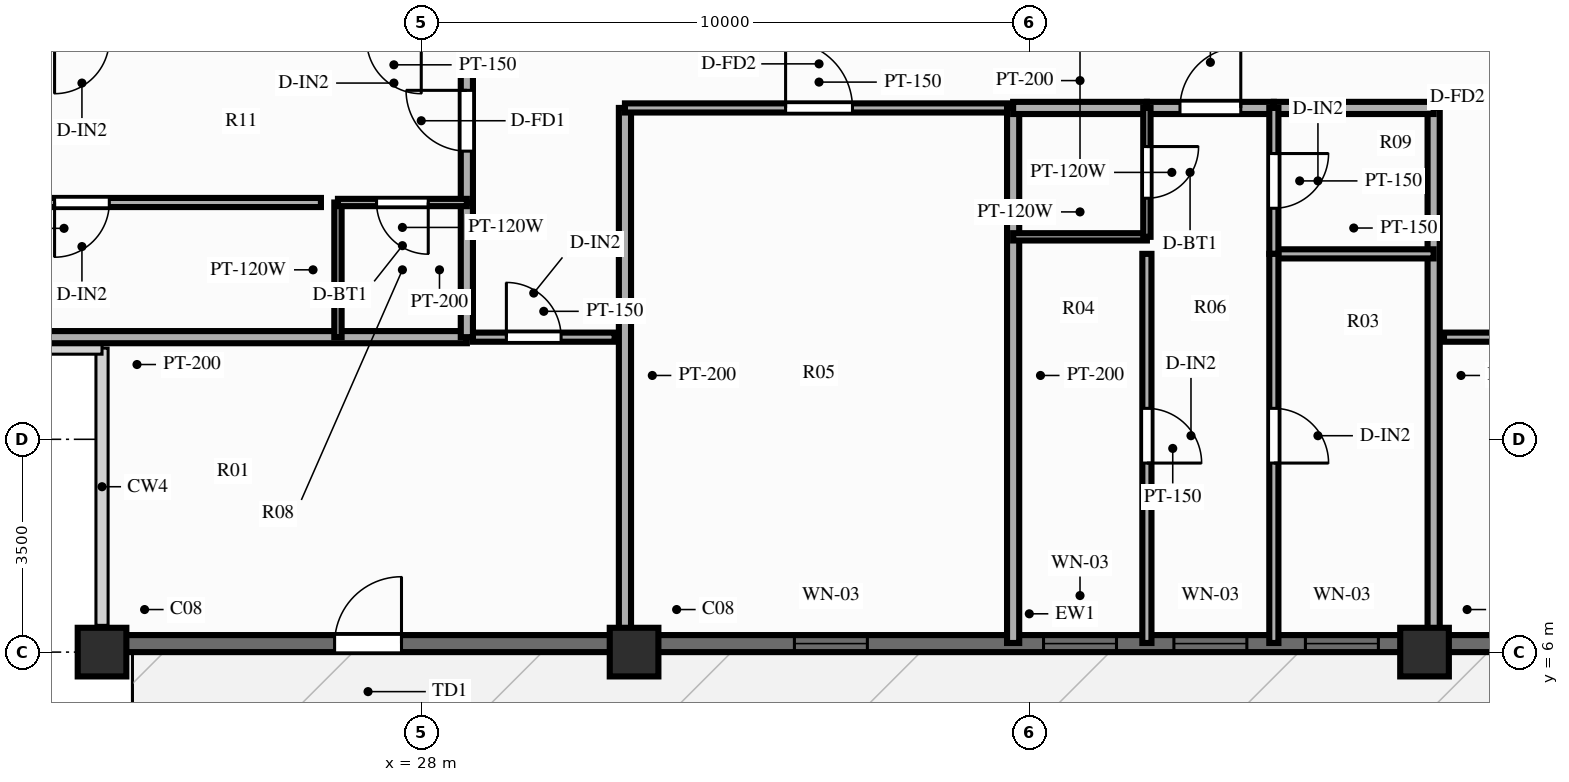
"""IFC4 building model, lengths in metres.
Left out: names, types, materials, properties, quantities, classifications, styles, units other than length and angle.
Written with IfcOpenShell. Run it as: python <this file> out.ifc"""

import sys

from ifc_helpers import new_model, si_unit, direction, frame, frame_2d, origin, origin_2d, place, context, subcontext, project, spatial, rectangle, extrude, source, transform, mapped, element, fill, save


model = new_model("IFC4")
c1 = context("Model", 3, precision=1e-05, world=origin(), true_north=direction((0.0, 1.0)))
c2 = subcontext(c1, "Body", "Model", "MODEL_VIEW")
j1 = project(units=[si_unit("LENGTHUNIT", "METRE"), si_unit("PLANEANGLEUNIT", "RADIAN")], contexts=[c1])
p1 = place(None, origin())
s1 = spatial("IfcSite", under=j1, at=p1, CompositionType="ELEMENT")
p2 = place(p1, origin())
s2 = spatial("IfcBuilding", under=s1, at=p2, CompositionType="ELEMENT")
p3 = place(p2, frame((0.0, 0.0, 186.7)))
s3 = spatial("IfcBuildingStorey", under=s2, at=p3, CompositionType="ELEMENT", Elevation=186.7)
m1 = source(origin(), c2, "Body", "SweptSolid", [
    extrude(rectangle(XDim=0.8, YDim=0.8, at=origin_2d()), origin(), (0.0, 0.0, 1.0), 3.0),
])
for number, where, z_axis, x_axis in (
    (1, (22.75, 6.0, 0.0), (0.0, 0.0, 1.0), (1.0, 0.0, 0.0)),
    (2, (31.5, 6.0, 0.0), (0.0, 0.0, 1.0), (1.0, 0.0, 0.0)),
    (3, (44.5, 6.0, 0.0), (0.0, 0.0, 1.0), (1.0, 0.0, 0.0)),
):
    element("IfcColumn", number, at=place(p3, frame(where, z_axis=z_axis, x_axis=x_axis)), inside=s3, PredefinedType="COLUMN", context=c2, shape_type="MappedRepresentation", body=[
        mapped(m1, transform((0.0, 0.0, 0.0), scale=1.0)),
    ])
p4 = place(p3, frame((22.75, 6.14, 0.0), z_axis=(0.0, 0.0, 1.0), x_axis=(1.0, 0.0, 0.0)))
e4 = element("IfcWall", 4, at=p4, inside=s3, PredefinedType="SOLIDWALL", context=c2, shape_type="SweptSolid", body=[
    extrude(rectangle(XDim=30.5, YDim=0.28, at=frame_2d((15.25, 0.0))), origin(), (0.0, 0.0, 1.0), 2.28),
])
p5 = place(p4, frame((4.925, 0.0, 0.0), z_axis=(0.0, 0.0, 1.0), x_axis=(-1.0, 0.0, 0.0)))
e5 = element("IfcOpeningElement", 5, at=p5, cuts=e4, PredefinedType="OPENING", context=c2, shape_type="SweptSolid", body=[
    extrude(rectangle(XDim=1.1, YDim=2.15, at=frame_2d((0.55, 1.075))), frame((0.0, 0.152, 0.0), z_axis=(0.0, -1.0, 0.0), x_axis=(1.0, 0.0, 0.0)), (0.0, 0.0, 1.0), 0.304),
])
p6 = place(p4, frame((11.387, 0.0, 0.25)))
e6 = element("IfcOpeningElement", 6, at=p6, cuts=e4, PredefinedType="OPENING", context=c2, shape_type="SweptSolid", body=[
    extrude(rectangle(XDim=1.2, YDim=1.5, at=frame_2d((0.6, 0.75))), frame((0.0, 0.152, 0.0), z_axis=(0.0, -1.0, 0.0), x_axis=(1.0, 0.0, 0.0)), (0.0, 0.0, 1.0), 0.304),
])
p7 = place(p4, frame((15.484, 0.0, 0.25)))
e7 = element("IfcOpeningElement", 7, at=p7, cuts=e4, PredefinedType="OPENING", context=c2, shape_type="SweptSolid", body=[
    extrude(rectangle(XDim=1.2, YDim=1.5, at=frame_2d((0.6, 0.75))), frame((0.0, 0.152, 0.0), z_axis=(0.0, -1.0, 0.0), x_axis=(1.0, 0.0, 0.0)), (0.0, 0.0, 1.0), 0.304),
])
p8 = place(p4, frame((17.628, 0.0, 0.25)))
e8 = element("IfcOpeningElement", 8, at=p8, cuts=e4, PredefinedType="OPENING", context=c2, shape_type="SweptSolid", body=[
    extrude(rectangle(XDim=1.2, YDim=1.5, at=frame_2d((0.6, 0.75))), frame((0.0, 0.152, 0.0), z_axis=(0.0, -1.0, 0.0), x_axis=(1.0, 0.0, 0.0)), (0.0, 0.0, 1.0), 0.304),
])
p9 = place(p4, frame((19.791, 0.0, 0.25)))
e9 = element("IfcOpeningElement", 9, at=p9, cuts=e4, PredefinedType="OPENING", context=c2, shape_type="SweptSolid", body=[
    extrude(rectangle(XDim=1.2, YDim=1.5, at=frame_2d((0.6, 0.75))), frame((0.0, 0.152, 0.0), z_axis=(0.0, -1.0, 0.0), x_axis=(1.0, 0.0, 0.0)), (0.0, 0.0, 1.0), 0.304),
])
p10 = place(p4, frame((25.525, 0.0, 0.25)))
e10 = element("IfcOpeningElement", 10, at=p10, cuts=e4, PredefinedType="OPENING", context=c2, shape_type="SweptSolid", body=[
    extrude(rectangle(XDim=1.2, YDim=1.5, at=frame_2d((0.6, 0.75))), frame((0.0, 0.152, 0.0), z_axis=(0.0, -1.0, 0.0), x_axis=(1.0, 0.0, 0.0)), (0.0, 0.0, 1.0), 0.304),
])
p11 = place(p3, frame((28.85, 11.18, 0.0), z_axis=(0.0, 0.0, 1.0), x_axis=(1.0, 0.0, 0.0)))
e11 = element("IfcWall", 11, at=p11, inside=s3, PredefinedType="PARTITIONING", context=c2, shape_type="SweptSolid", body=[
    extrude(rectangle(XDim=2.33, YDim=0.15, at=frame_2d((1.165, 0.0))), origin(), (0.0, 0.0, 1.0), 2.79),
])
p12 = place(p11, frame((0.55, 0.0, 0.0)))
e12 = element("IfcOpeningElement", 12, at=p12, cuts=e11, PredefinedType="OPENING", context=c2, shape_type="SweptSolid", body=[
    extrude(rectangle(XDim=0.9, YDim=2.1, at=frame_2d((0.45, 1.05))), frame((0.0, 0.087, 0.0), z_axis=(0.0, -1.0, 0.0), x_axis=(1.0, 0.0, 0.0)), (0.0, 0.0, 1.0), 0.174),
])
p13 = place(p3, frame((44.82, 11.18, 0.0), z_axis=(0.0, 0.0, 1.0), x_axis=(1.0, 0.0, 0.0)))
e13 = element("IfcWall", 13, at=p13, inside=s3, PredefinedType="PARTITIONING", context=c2, shape_type="SweptSolid", body=[
    extrude(rectangle(XDim=2.33, YDim=0.15, at=frame_2d((1.165, 0.0))), origin(), (0.0, 0.0, 1.0), 2.79),
])
p14 = place(p13, frame((0.88, 0.0, 0.0)))
e14 = element("IfcOpeningElement", 14, at=p14, cuts=e13, PredefinedType="OPENING", context=c2, shape_type="SweptSolid", body=[
    extrude(rectangle(XDim=0.9, YDim=2.1, at=frame_2d((0.45, 1.05))), frame((0.0, 0.087, 0.0), z_axis=(0.0, -1.0, 0.0), x_axis=(1.0, 0.0, 0.0)), (0.0, 0.0, 1.0), 0.174),
])
for number, where, z_axis, x_axis in (
    (15, (31.35, 14.95, 0.0), (0.0, 0.0, 1.0), (0.0, -1.0, 0.0)),
    (16, (44.65, 14.95, 0.0), (0.0, 0.0, 1.0), (0.0, -1.0, 0.0)),
):
    element("IfcWall", number, at=place(p3, frame(where, z_axis=z_axis, x_axis=x_axis)), inside=s3, PredefinedType="PARTITIONING", context=c2, shape_type="SweptSolid", body=[
        extrude(rectangle(XDim=8.8, YDim=0.2, at=frame_2d((4.4, 0.0))), origin(), (0.0, 0.0, 1.0), 2.39),
    ])
p15 = place(p3, frame((31.35, 14.95, 0.0), z_axis=(0.0, 0.0, 1.0), x_axis=(1.0, 0.0, 0.0)))
e17 = element("IfcWall", 17, at=p15, inside=s3, PredefinedType="PARTITIONING", context=c2, shape_type="SweptSolid", body=[
    extrude(rectangle(XDim=6.384, YDim=0.15, at=frame_2d((3.192, 0.0))), origin(), (0.0, 0.0, 1.0), 2.79),
])
p16 = place(p15, frame((2.642, 0.0, 0.0)))
e18 = element("IfcOpeningElement", 18, at=p16, cuts=e17, PredefinedType="OPENING", context=c2, shape_type="SweptSolid", body=[
    extrude(rectangle(XDim=1.1, YDim=2.15, at=frame_2d((0.55, 1.075))), frame((0.0, 0.087, 0.0), z_axis=(0.0, -1.0, 0.0), x_axis=(1.0, 0.0, 0.0)), (0.0, 0.0, 1.0), 0.174),
])
p17 = place(p3, frame((37.734, 14.95, 0.0), z_axis=(0.0, 0.0, 1.0), x_axis=(0.0, -1.0, 0.0)))
e19 = element("IfcWall", 19, at=p17, inside=s3, PredefinedType="PARTITIONING", context=c2, shape_type="SweptSolid", body=[
    extrude(rectangle(XDim=8.8, YDim=0.2, at=frame_2d((4.4, 0.0))), origin(), (0.0, 0.0, 1.0), 2.79),
])
p18 = place(p3, frame((37.734, 14.95, 0.0), z_axis=(0.0, 0.0, 1.0), x_axis=(1.0, 0.0, 0.0)))
e20 = element("IfcWall", 20, at=p18, inside=s3, PredefinedType="PARTITIONING", context=c2, shape_type="SweptSolid", body=[
    extrude(rectangle(XDim=2.2, YDim=0.2, at=frame_2d((1.1, 0.0))), origin(), (0.0, 0.0, 1.0), 2.79),
])
p19 = place(p3, frame((39.934, 14.95, 0.0), z_axis=(0.0, 0.0, 1.0), x_axis=(1.0, 0.0, 0.0)))
e21 = element("IfcWall", 21, at=p19, inside=s3, PredefinedType="PARTITIONING", context=c2, shape_type="SweptSolid", body=[
    extrude(rectangle(XDim=2.088, YDim=0.2, at=frame_2d((1.044, 0.0))), origin(), (0.0, 0.0, 1.0), 2.79),
])
p20 = place(p19, frame((0.544, 0.0, 0.0)))
e22 = element("IfcOpeningElement", 22, at=p20, cuts=e21, PredefinedType="OPENING", context=c2, shape_type="SweptSolid", body=[
    extrude(rectangle(XDim=1.0, YDim=2.15, at=frame_2d((0.5, 1.075))), frame((0.0, 0.112, 0.0), z_axis=(0.0, -1.0, 0.0), x_axis=(1.0, 0.0, 0.0)), (0.0, 0.0, 1.0), 0.224),
])
p21 = place(p3, frame((42.022, 14.95, 0.0), z_axis=(0.0, 0.0, 1.0), x_axis=(1.0, 0.0, 0.0)))
e23 = element("IfcWall", 23, at=p21, inside=s3, PredefinedType="PARTITIONING", context=c2, shape_type="SweptSolid", body=[
    extrude(rectangle(XDim=2.628, YDim=0.2, at=frame_2d((1.314, 0.0))), origin(), (0.0, 0.0, 1.0), 2.79),
])
p22 = place(p3, frame((37.734, 12.83, 0.0), z_axis=(0.0, 0.0, 1.0), x_axis=(1.0, 0.0, 0.0)))
e24 = element("IfcWall", 24, at=p22, inside=s3, PredefinedType="PARTITIONING", context=c2, shape_type="SweptSolid", body=[
    extrude(rectangle(XDim=2.2, YDim=0.12, at=frame_2d((1.1, 0.0))), origin(), (0.0, 0.0, 1.0), 2.79),
])
p23 = place(p3, frame((42.022, 12.55, 0.0), z_axis=(0.0, 0.0, 1.0), x_axis=(1.0, 0.0, 0.0)))
e25 = element("IfcWall", 25, at=p23, inside=s3, PredefinedType="PARTITIONING", context=c2, shape_type="SweptSolid", body=[
    extrude(rectangle(XDim=2.628, YDim=0.15, at=frame_2d((1.314, 0.0))), origin(), (0.0, 0.0, 1.0), 2.79),
])
p24 = place(p3, frame((39.934, 14.95, 0.0), z_axis=(0.0, 0.0, 1.0), x_axis=(0.0, -1.0, 0.0)))
e26 = element("IfcWall", 26, at=p24, inside=s3, PredefinedType="PARTITIONING", context=c2, shape_type="SweptSolid", body=[
    extrude(rectangle(XDim=2.12, YDim=0.12, at=frame_2d((1.06, 0.0))), origin(), (0.0, 0.0, 1.0), 2.79),
])
p25 = place(p24, frame((0.635, 0.0, 0.0)))
e27 = element("IfcOpeningElement", 27, at=p25, cuts=e26, PredefinedType="OPENING", context=c2, shape_type="SweptSolid", body=[
    extrude(rectangle(XDim=0.85, YDim=2.05, at=frame_2d((0.425, 1.025))), frame((0.0, 0.072, 0.0), z_axis=(0.0, -1.0, 0.0), x_axis=(1.0, 0.0, 0.0)), (0.0, 0.0, 1.0), 0.144),
])
p26 = place(p3, frame((39.934, 12.55, 0.0), z_axis=(0.0, 0.0, 1.0), x_axis=(0.0, -1.0, 0.0)))
e28 = element("IfcWall", 28, at=p26, inside=s3, PredefinedType="PARTITIONING", context=c2, shape_type="SweptSolid", body=[
    extrude(rectangle(XDim=6.4, YDim=0.15, at=frame_2d((3.2, 0.0))), origin(), (0.0, 0.0, 1.0), 2.79),
])
p27 = place(p26, frame((2.541, 0.0, 0.0)))
e29 = element("IfcOpeningElement", 29, at=p27, cuts=e28, PredefinedType="OPENING", context=c2, shape_type="SweptSolid", body=[
    extrude(rectangle(XDim=0.9, YDim=2.1, at=frame_2d((0.45, 1.05))), frame((0.0, 0.087, 0.0), z_axis=(0.0, -1.0, 0.0), x_axis=(1.0, 0.0, 0.0)), (0.0, 0.0, 1.0), 0.174),
])
p28 = place(p3, frame((42.022, 14.95, 0.0), z_axis=(0.0, 0.0, 1.0), x_axis=(0.0, -1.0, 0.0)))
e30 = element("IfcWall", 30, at=p28, inside=s3, PredefinedType="PARTITIONING", context=c2, shape_type="SweptSolid", body=[
    extrude(rectangle(XDim=2.4, YDim=0.15, at=frame_2d((1.2, 0.0))), origin(), (0.0, 0.0, 1.0), 2.79),
])
p29 = place(p28, frame((0.75, 0.0, 0.0)))
e31 = element("IfcOpeningElement", 31, at=p29, cuts=e30, PredefinedType="OPENING", context=c2, shape_type="SweptSolid", body=[
    extrude(rectangle(XDim=0.9, YDim=2.1, at=frame_2d((0.45, 1.05))), frame((0.0, 0.087, 0.0), z_axis=(0.0, -1.0, 0.0), x_axis=(1.0, 0.0, 0.0)), (0.0, 0.0, 1.0), 0.174),
])
p30 = place(p3, frame((42.022, 12.55, 0.0), z_axis=(0.0, 0.0, 1.0), x_axis=(0.0, -1.0, 0.0)))
e32 = element("IfcWall", 32, at=p30, inside=s3, PredefinedType="PARTITIONING", context=c2, shape_type="SweptSolid", body=[
    extrude(rectangle(XDim=6.4, YDim=0.15, at=frame_2d((3.2, 0.0))), origin(), (0.0, 0.0, 1.0), 2.79),
])
p31 = place(p30, frame((2.541, 0.0, 0.0)))
e33 = element("IfcOpeningElement", 33, at=p31, cuts=e32, PredefinedType="OPENING", context=c2, shape_type="SweptSolid", body=[
    extrude(rectangle(XDim=0.9, YDim=2.1, at=frame_2d((0.45, 1.05))), frame((0.0, 0.087, 0.0), z_axis=(0.0, -1.0, 0.0), x_axis=(1.0, 0.0, 0.0)), (0.0, 0.0, 1.0), 0.174),
])
p32 = place(p3, frame((28.75, 11.18, 0.0), z_axis=(0.0, 0.0, 1.0), x_axis=(-1.0, 0.0, 0.0)))
e34 = element("IfcWall", 34, at=p32, inside=s3, PredefinedType="PARTITIONING", context=c2, shape_type="SweptSolid", body=[
    extrude(rectangle(XDim=10.85, YDim=0.2, at=frame_2d((5.425, 0.0))), origin(), (0.0, 0.0, 1.0), 2.79),
])
p33 = place(p3, frame((28.75, 11.18, 0.0), z_axis=(0.0, 0.0, 1.0), x_axis=(0.0, 1.0, 0.0)))
e35 = element("IfcWall", 35, at=p33, inside=s3, PredefinedType="PARTITIONING", context=c2, shape_type="SweptSolid", body=[
    extrude(rectangle(XDim=2.215, YDim=0.2, at=frame_2d((1.107, 0.0))), origin(), (0.0, 0.0, 1.0), 2.79),
])
p34 = place(p3, frame((28.75, 13.395, 0.0), z_axis=(0.0, 0.0, 1.0), x_axis=(0.0, 1.0, 0.0)))
e36 = element("IfcWall", 36, at=p34, inside=s3, PredefinedType="PARTITIONING", context=c2, shape_type="SweptSolid", body=[
    extrude(rectangle(XDim=2.689, YDim=0.2, at=frame_2d((1.345, 0.0))), origin(), (0.0, 0.0, 1.0), 2.79),
])
p35 = place(p34, frame((0.845, 0.0, 0.0)))
e37 = element("IfcOpeningElement", 37, at=p35, cuts=e36, PredefinedType="OPENING", context=c2, shape_type="SweptSolid", body=[
    extrude(rectangle(XDim=1.0, YDim=2.15, at=frame_2d((0.5, 1.075))), frame((0.0, 0.112, 0.0), z_axis=(0.0, -1.0, 0.0), x_axis=(1.0, 0.0, 0.0)), (0.0, 0.0, 1.0), 0.224),
])
p36 = place(p3, frame((26.63, 11.18, 0.0), z_axis=(0.0, 0.0, 1.0), x_axis=(0.0, 1.0, 0.0)))
e38 = element("IfcWall", 38, at=p36, inside=s3, PredefinedType="PARTITIONING", context=c2, shape_type="SweptSolid", body=[
    extrude(rectangle(XDim=2.215, YDim=0.12, at=frame_2d((1.107, 0.0))), origin(), (0.0, 0.0, 1.0), 2.79),
])
p37 = place(p3, frame((28.75, 13.395, 0.0), z_axis=(0.0, 0.0, 1.0), x_axis=(-1.0, 0.0, 0.0)))
e39 = element("IfcWall", 39, at=p37, inside=s3, PredefinedType="PARTITIONING", context=c2, shape_type="SweptSolid", body=[
    extrude(rectangle(XDim=2.12, YDim=0.12, at=frame_2d((1.06, 0.0))), origin(), (0.0, 0.0, 1.0), 2.79),
])
p38 = place(p37, frame((0.635, 0.0, 0.0)))
e40 = element("IfcOpeningElement", 40, at=p38, cuts=e39, PredefinedType="OPENING", context=c2, shape_type="SweptSolid", body=[
    extrude(rectangle(XDim=0.85, YDim=2.05, at=frame_2d((0.425, 1.025))), frame((0.0, 0.072, 0.0), z_axis=(0.0, -1.0, 0.0), x_axis=(1.0, 0.0, 0.0)), (0.0, 0.0, 1.0), 0.144),
])
p39 = place(p3, frame((26.35, 13.395, 0.0), z_axis=(0.0, 0.0, 1.0), x_axis=(-1.0, 0.0, 0.0)))
e41 = element("IfcWall", 41, at=p39, inside=s3, PredefinedType="PARTITIONING", context=c2, shape_type="SweptSolid", body=[
    extrude(rectangle(XDim=8.45, YDim=0.15, at=frame_2d((4.225, 0.0))), origin(), (0.0, 0.0, 1.0), 2.79),
])
p40 = place(p39, frame((3.48, 0.0, 0.0)))
e42 = element("IfcOpeningElement", 42, at=p40, cuts=e41, PredefinedType="OPENING", context=c2, shape_type="SweptSolid", body=[
    extrude(rectangle(XDim=0.9, YDim=2.1, at=frame_2d((0.45, 1.05))), frame((0.0, 0.087, 0.0), z_axis=(0.0, -1.0, 0.0), x_axis=(1.0, 0.0, 0.0)), (0.0, 0.0, 1.0), 0.174),
])
m2 = source(origin(), c2, "Body", "SweptSolid", [
    extrude(rectangle(XDim=1.1, YDim=2.15, at=frame_2d((0.55, 1.075))), frame((0.0, 0.025, 0.0), z_axis=(0.0, -1.0, 0.0), x_axis=(1.0, 0.0, 0.0)), (0.0, 0.0, 1.0), 0.05),
])
p41 = place(p5, origin())
e43 = element("IfcDoor", 43, at=p41, inside=s3, OperationType="SINGLE_SWING_LEFT", PredefinedType="DOOR", context=c2, shape_type="MappedRepresentation", body=[
    mapped(m2, transform((0.0, 0.0, 0.0), scale=1.0)),
])
fill(e5, e43)
m3 = source(origin(), c2, "Body", "SweptSolid", [
    extrude(rectangle(XDim=1.2, YDim=1.5, at=frame_2d((0.6, 0.75))), frame((0.0, 0.03, 0.0), z_axis=(0.0, -1.0, 0.0), x_axis=(1.0, 0.0, 0.0)), (0.0, 0.0, 1.0), 0.06),
])
p42 = place(p6, origin())
e44 = element("IfcWindow", 44, at=p42, inside=s3, PartitioningType="SINGLE_PANEL", PredefinedType="WINDOW", context=c2, shape_type="MappedRepresentation", body=[
    mapped(m3, transform((0.0, 0.0, 0.0), scale=1.0)),
])
fill(e6, e44)
p43 = place(p7, origin())
e45 = element("IfcWindow", 45, at=p43, inside=s3, PartitioningType="SINGLE_PANEL", PredefinedType="WINDOW", context=c2, shape_type="MappedRepresentation", body=[
    mapped(m3, transform((0.0, 0.0, 0.0), scale=1.0)),
])
fill(e7, e45)
p44 = place(p8, origin())
e46 = element("IfcWindow", 46, at=p44, inside=s3, PartitioningType="SINGLE_PANEL", PredefinedType="WINDOW", context=c2, shape_type="MappedRepresentation", body=[
    mapped(m3, transform((0.0, 0.0, 0.0), scale=1.0)),
])
fill(e8, e46)
p45 = place(p9, origin())
e47 = element("IfcWindow", 47, at=p45, inside=s3, PartitioningType="SINGLE_PANEL", PredefinedType="WINDOW", context=c2, shape_type="MappedRepresentation", body=[
    mapped(m3, transform((0.0, 0.0, 0.0), scale=1.0)),
])
fill(e9, e47)
m4 = source(origin(), c2, "Body", "SweptSolid", [
    extrude(rectangle(XDim=0.9, YDim=2.1, at=frame_2d((0.45, 1.05))), frame((0.0, 0.025, 0.0), z_axis=(0.0, -1.0, 0.0), x_axis=(1.0, 0.0, 0.0)), (0.0, 0.0, 1.0), 0.05),
])
p46 = place(p12, origin())
e48 = element("IfcDoor", 48, at=p46, inside=s3, OperationType="SINGLE_SWING_LEFT", PredefinedType="DOOR", context=c2, shape_type="MappedRepresentation", body=[
    mapped(m4, transform((0.0, 0.0, 0.0), scale=1.0)),
])
fill(e12, e48)
p47 = place(p16, origin())
e49 = element("IfcDoor", 49, at=p47, inside=s3, OperationType="SINGLE_SWING_LEFT", PredefinedType="DOOR", context=c2, shape_type="MappedRepresentation", body=[
    mapped(m2, transform((0.0, 0.0, 0.0), scale=1.0)),
])
fill(e18, e49)
m5 = source(origin(), c2, "Body", "SweptSolid", [
    extrude(rectangle(XDim=1.0, YDim=2.15, at=frame_2d((0.5, 1.075))), frame((0.0, 0.025, 0.0), z_axis=(0.0, -1.0, 0.0), x_axis=(1.0, 0.0, 0.0)), (0.0, 0.0, 1.0), 0.05),
])
p48 = place(p20, origin())
e50 = element("IfcDoor", 50, at=p48, inside=s3, OperationType="SINGLE_SWING_RIGHT", PredefinedType="DOOR", context=c2, shape_type="MappedRepresentation", body=[
    mapped(m5, transform((0.0, 0.0, 0.0), scale=1.0)),
])
fill(e22, e50)
m6 = source(origin(), c2, "Body", "SweptSolid", [
    extrude(rectangle(XDim=0.85, YDim=2.05, at=frame_2d((0.425, 1.025))), frame((0.0, 0.025, 0.0), z_axis=(0.0, -1.0, 0.0), x_axis=(1.0, 0.0, 0.0)), (0.0, 0.0, 1.0), 0.05),
])
p49 = place(p25, origin())
e51 = element("IfcDoor", 51, at=p49, inside=s3, OperationType="SINGLE_SWING_LEFT", PredefinedType="DOOR", context=c2, shape_type="MappedRepresentation", body=[
    mapped(m6, transform((0.0, 0.0, 0.0), scale=1.0)),
])
fill(e27, e51)
p50 = place(p27, origin())
e52 = element("IfcDoor", 52, at=p50, inside=s3, OperationType="SINGLE_SWING_RIGHT", PredefinedType="DOOR", context=c2, shape_type="MappedRepresentation", body=[
    mapped(m4, transform((0.0, 0.0, 0.0), scale=1.0)),
])
fill(e29, e52)
p51 = place(p29, origin())
e53 = element("IfcDoor", 53, at=p51, inside=s3, OperationType="SINGLE_SWING_LEFT", PredefinedType="DOOR", context=c2, shape_type="MappedRepresentation", body=[
    mapped(m4, transform((0.0, 0.0, 0.0), scale=1.0)),
])
fill(e31, e53)
p52 = place(p31, origin())
e54 = element("IfcDoor", 54, at=p52, inside=s3, OperationType="SINGLE_SWING_RIGHT", PredefinedType="DOOR", context=c2, shape_type="MappedRepresentation", body=[
    mapped(m4, transform((0.0, 0.0, 0.0), scale=1.0)),
])
fill(e33, e54)
p53 = place(p35, origin())
e55 = element("IfcDoor", 55, at=p53, inside=s3, OperationType="SINGLE_SWING_RIGHT", PredefinedType="DOOR", context=c2, shape_type="MappedRepresentation", body=[
    mapped(m5, transform((0.0, 0.0, 0.0), scale=1.0)),
])
fill(e37, e55)
p54 = place(p38, origin())
e56 = element("IfcDoor", 56, at=p54, inside=s3, OperationType="SINGLE_SWING_LEFT", PredefinedType="DOOR", context=c2, shape_type="MappedRepresentation", body=[
    mapped(m6, transform((0.0, 0.0, 0.0), scale=1.0)),
])
fill(e40, e56)
p55 = place(p40, origin())
e57 = element("IfcDoor", 57, at=p55, inside=s3, OperationType="SINGLE_SWING_RIGHT", PredefinedType="DOOR", context=c2, shape_type="MappedRepresentation", body=[
    mapped(m4, transform((0.0, 0.0, 0.0), scale=1.0)),
])
fill(e42, e57)
save(model, sys.argv[1])
